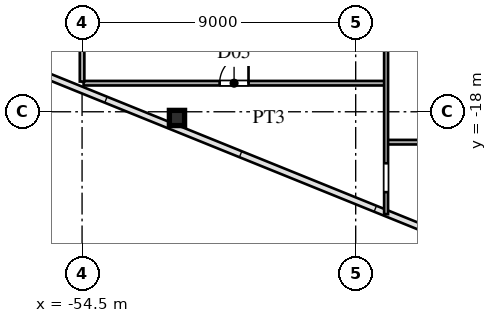
"""IFC4 building model, lengths in metres.
Left out: names, types, materials, properties, quantities, classifications, styles, units other than length and angle.
Written with IfcOpenShell. Run it as: python <this file> out.ifc"""

import sys

from ifc_helpers import new_model, si_unit, direction, frame, frame_2d, origin, origin_2d, place, context, subcontext, project, spatial, rectangle, hollow_rectangle, extrude, source, transform, mapped, element, fill, save


model = new_model("IFC4")
c1 = context("Model", 3, precision=1e-05, world=origin(), true_north=direction((0.0, 1.0)))
c2 = subcontext(c1, "Body", "Model", "MODEL_VIEW")
j1 = project(units=[si_unit("LENGTHUNIT", "METRE"), si_unit("PLANEANGLEUNIT", "RADIAN")], contexts=[c1])
p1 = place(None, origin())
s1 = spatial("IfcSite", under=j1, at=p1, CompositionType="ELEMENT")
p2 = place(p1, origin())
s2 = spatial("IfcBuilding", under=s1, at=p2, CompositionType="ELEMENT")
p3 = place(p2, frame((0.0, 0.0, 51.3)))
s3 = spatial("IfcBuildingStorey", under=s2, at=p3, CompositionType="ELEMENT", Elevation=51.3)
m1 = source(origin(), c2, "Body", "SweptSolid", [
    extrude(hollow_rectangle(XDim=0.5, YDim=0.5, WallThickness=0.02, at=origin_2d()), origin(), (0.0, 0.0, 1.0), 3.6),
])
p4 = place(p3, frame((-51.378, -18.204, 0.0), z_axis=(0.0, 0.0, 1.0), x_axis=(1.0, 0.0, 0.0)))
e1 = element("IfcColumn", 1, at=p4, inside=s3, PredefinedType="COLUMN", context=c2, shape_type="MappedRepresentation", body=[
    mapped(m1, transform((0.0, 0.0, 0.0), scale=1.0)),
])
p5 = place(p3, frame((-44.45, -19.0, 0.0), z_axis=(0.0, 0.0, 1.0), x_axis=(1.0, 0.0, 0.0)))
e2 = element("IfcWall", 2, at=p5, inside=s3, PredefinedType="PARTITIONING", context=c2, shape_type="SweptSolid", body=[
    extrude(rectangle(XDim=6.15, YDim=0.15, at=frame_2d((3.075, 0.0))), origin(), (0.0, 0.0, 1.0), 3.38),
])
p6 = place(p3, frame((-54.45, -17.06, 0.0), z_axis=(0.0, 0.0, 1.0), x_axis=(1.0, 0.0, 0.0)))
e3 = element("IfcWall", 3, at=p6, inside=s3, PredefinedType="PARTITIONING", context=c2, shape_type="SweptSolid", body=[
    extrude(rectangle(XDim=9.9, YDim=0.15, at=frame_2d((4.95, 0.0))), origin(), (0.0, 0.0, 1.0), 3.38),
])
p7 = place(p6, frame((4.475, 0.0, 0.0)))
e4 = element("IfcOpeningElement", 4, at=p7, cuts=e3, PredefinedType="OPENING", context=c2, shape_type="SweptSolid", body=[
    extrude(rectangle(XDim=0.95, YDim=2.15, at=frame_2d((0.475, 1.075))), frame((0.0, 0.085, 0.0), z_axis=(0.0, -1.0, 0.0), x_axis=(1.0, 0.0, 0.0)), (0.0, 0.0, 1.0), 0.17),
])
p8 = place(p3, frame((-54.5, -17.006, 0.0), z_axis=(0.0, 0.0, 1.0), x_axis=(0.0, 1.0, 0.0)))
e5 = element("IfcWall", 5, at=p8, inside=s3, PredefinedType="PARTITIONING", context=c2, shape_type="SweptSolid", body=[
    extrude(rectangle(XDim=33.012, YDim=0.15, at=frame_2d((16.506, 0.0))), origin(), (0.0, 0.0, 1.0), 2.68),
])
p9 = place(p8, frame((5.892, 0.0, 0.0)))
e6 = element("IfcOpeningElement", 6, at=p9, cuts=e5, PredefinedType="OPENING", context=c2, shape_type="SweptSolid", body=[
    extrude(rectangle(XDim=0.95, YDim=2.15, at=frame_2d((0.475, 1.075))), frame((0.0, 0.085, 0.0), z_axis=(0.0, -1.0, 0.0), x_axis=(1.0, 0.0, 0.0)), (0.0, 0.0, 1.0), 0.17),
])
p10 = place(p8, frame((15.031, 0.0, 0.0)))
e7 = element("IfcOpeningElement", 7, at=p10, cuts=e5, PredefinedType="OPENING", context=c2, shape_type="SweptSolid", body=[
    extrude(rectangle(XDim=0.95, YDim=2.15, at=frame_2d((0.475, 1.075))), frame((0.0, 0.085, 0.0), z_axis=(0.0, -1.0, 0.0), x_axis=(1.0, 0.0, 0.0)), (0.0, 0.0, 1.0), 0.17),
])
p11 = place(p8, frame((24.67, 0.0, 0.0)))
e8 = element("IfcOpeningElement", 8, at=p11, cuts=e5, PredefinedType="OPENING", context=c2, shape_type="SweptSolid", body=[
    extrude(rectangle(XDim=0.95, YDim=2.15, at=frame_2d((0.475, 1.075))), frame((0.0, 0.085, 0.0), z_axis=(0.0, -1.0, 0.0), x_axis=(1.0, 0.0, 0.0)), (0.0, 0.0, 1.0), 0.17),
])
p12 = place(p3, frame((-44.5, -21.368, 0.0), z_axis=(0.0, 0.0, 1.0), x_axis=(0.0, 1.0, 0.0)))
e9 = element("IfcWall", 9, at=p12, inside=s3, PredefinedType="PARTITIONING", context=c2, shape_type="SweptSolid", body=[
    extrude(rectangle(XDim=22.151, YDim=0.13, at=frame_2d((11.075, 0.0))), origin(), (0.0, 0.0, 1.0), 3.38),
])
p13 = place(p12, frame((8.932, 0.0, 0.0)))
e10 = element("IfcOpeningElement", 10, at=p13, cuts=e9, PredefinedType="OPENING", context=c2, shape_type="SweptSolid", body=[
    extrude(rectangle(XDim=0.95, YDim=2.15, at=frame_2d((0.475, 1.075))), frame((0.0, 0.075, 0.0), z_axis=(0.0, -1.0, 0.0), x_axis=(1.0, 0.0, 0.0)), (0.0, 0.0, 1.0), 0.15),
])
p14 = place(p12, frame((0.724, 0.0, 0.0)))
e11 = element("IfcOpeningElement", 11, at=p14, cuts=e9, PredefinedType="OPENING", context=c2, shape_type="SweptSolid", body=[
    extrude(rectangle(XDim=0.95, YDim=2.15, at=frame_2d((0.475, 1.075))), frame((0.0, 0.075, 0.0), z_axis=(0.0, -1.0, 0.0), x_axis=(1.0, 0.0, 0.0)), (0.0, 0.0, 1.0), 0.15),
])
p15 = place(p12, frame((19.393, 0.0, 0.0)))
e12 = element("IfcOpeningElement", 12, at=p15, cuts=e9, PredefinedType="OPENING", context=c2, shape_type="SweptSolid", body=[
    extrude(rectangle(XDim=0.95, YDim=2.15, at=frame_2d((0.475, 1.075))), frame((0.0, 0.075, 0.0), z_axis=(0.0, -1.0, 0.0), x_axis=(1.0, 0.0, 0.0)), (0.0, 0.0, 1.0), 0.15),
])
m2 = source(origin(), c2, "Body", "SweptSolid", [
    extrude(rectangle(XDim=0.95, YDim=2.15, at=frame_2d((0.475, 1.075))), frame((0.0, 0.025, 0.0), z_axis=(0.0, -1.0, 0.0), x_axis=(1.0, 0.0, 0.0)), (0.0, 0.0, 1.0), 0.05),
])
p16 = place(p7, origin())
e13 = element("IfcDoor", 13, at=p16, inside=s3, OperationType="SINGLE_SWING_RIGHT", PredefinedType="DOOR", context=c2, shape_type="MappedRepresentation", body=[
    mapped(m2, transform((0.0, 0.0, 0.0), scale=1.0)),
])
fill(e4, e13)
save(model, sys.argv[1])
